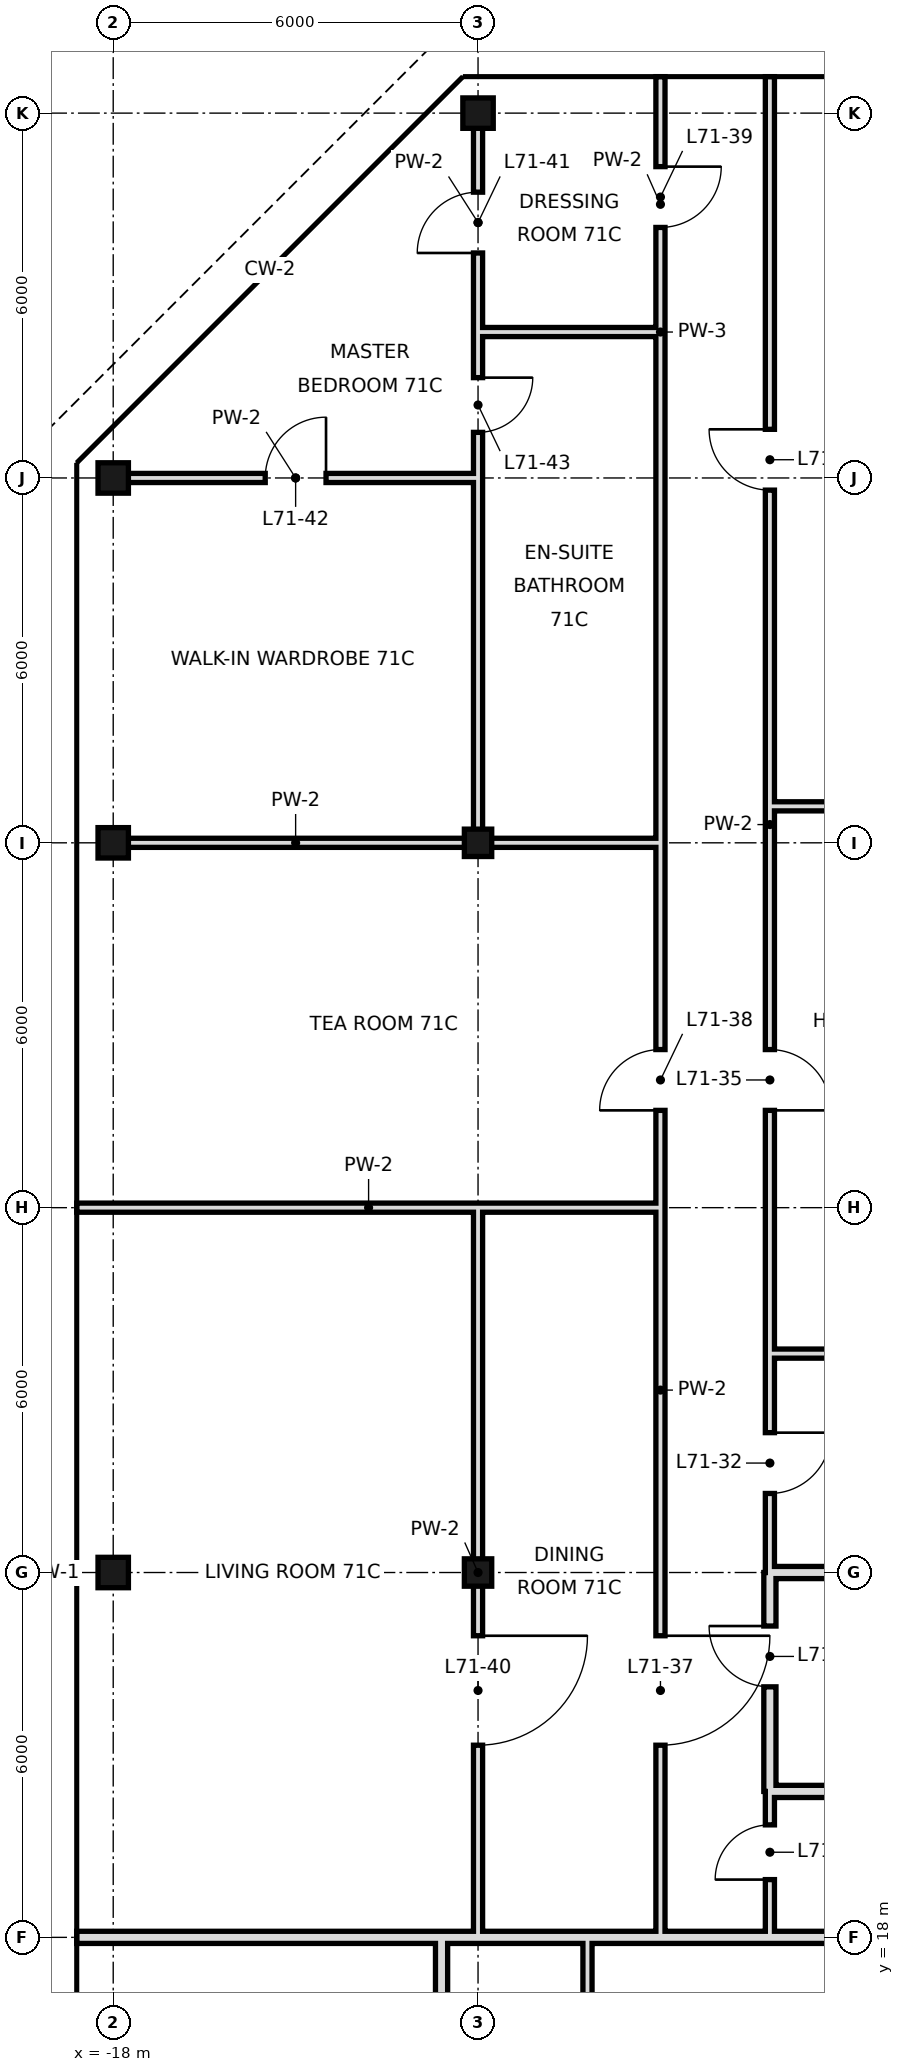
"""IFC4 building model, lengths in metres.
Left out: names, types, materials, properties, quantities, classifications, styles, units other than length and angle.
Written with IfcOpenShell. Run it as: python <this file> out.ifc"""

import sys

from ifc_helpers import new_model, si_unit, direction, frame, frame_2d, origin, origin_2d, place, context, subcontext, project, spatial, rectangle, hollow_rectangle, extrude, element, fill, save


model = new_model("IFC4")
c1 = context("Model", 3, precision=1e-05, world=origin(), true_north=direction((0.0, 1.0)))
c2 = subcontext(c1, "Body", "Model", "MODEL_VIEW")
j1 = project(units=[si_unit("LENGTHUNIT", "METRE"), si_unit("PLANEANGLEUNIT", "RADIAN")], contexts=[c1])
p1 = place(None, origin())
s1 = spatial("IfcSite", under=j1, at=p1, CompositionType="ELEMENT")
p2 = place(p1, origin())
s2 = spatial("IfcBuilding", under=s1, at=p2, CompositionType="ELEMENT")
p3 = place(p2, frame((0.0, 0.0, 301.6)))
s3 = spatial("IfcBuildingStorey", under=s2, at=p3, CompositionType="ELEMENT", Elevation=301.6)
for number, where, z_axis, x_axis in (
    (1, (-18.0, 24.0, 0.0), (0.0, 0.0, 1.0), (1.0, 0.0, 0.0)),
    (2, (-18.0, 36.0, 0.0), (0.0, 0.0, 1.0), (1.0, 0.0, 0.0)),
    (3, (-18.0, 42.0, 0.0), (0.0, 0.0, 1.0), (1.0, 0.0, 0.0)),
):
    element("IfcColumn", number, at=place(p3, frame(where, z_axis=z_axis, x_axis=x_axis)), inside=s3, PredefinedType="COLUMN", context=c2, shape_type="SweptSolid", body=[
        extrude(hollow_rectangle(XDim=0.5, YDim=0.5, WallThickness=0.025, at=origin_2d()), origin(), (0.0, 0.0, 1.0), 3.6),
    ])
for number, where, z_axis, x_axis in (
    (4, (-12.0, 24.0, 0.0), (0.0, 0.0, 1.0), (1.0, 0.0, 0.0)),
    (5, (-12.0, 36.0, 0.0), (0.0, 0.0, 1.0), (1.0, 0.0, 0.0)),
):
    element("IfcColumn", number, at=place(p3, frame(where, z_axis=z_axis, x_axis=x_axis)), inside=s3, PredefinedType="COLUMN", context=c2, shape_type="SweptSolid", body=[
        extrude(hollow_rectangle(XDim=0.45, YDim=0.45, WallThickness=0.022, at=origin_2d()), origin(), (0.0, 0.0, 1.0), 3.6),
    ])
p4 = place(p3, frame((-12.0, 48.0, 0.0), z_axis=(0.0, 0.0, 1.0), x_axis=(1.0, 0.0, 0.0)))
e6 = element("IfcColumn", 6, at=p4, inside=s3, PredefinedType="COLUMN", context=c2, shape_type="SweptSolid", body=[
    extrude(hollow_rectangle(XDim=0.5, YDim=0.5, WallThickness=0.025, at=origin_2d()), origin(), (0.0, 0.0, 1.0), 3.6),
])
p5 = place(p3, frame((-10.2, 10.8, 0.0), z_axis=(0.0, 0.0, 1.0), x_axis=(0.0, 1.0, 0.0)))
e7 = element("IfcWall", 7, at=p5, inside=s3, PredefinedType="PARTITIONING", context=c2, shape_type="SweptSolid", body=[
    extrude(rectangle(XDim=7.2, YDim=0.15, at=frame_2d((3.6, 0.0))), origin(), (0.0, 0.0, 1.0), 3.42),
])
p6 = place(p3, frame((-12.0, 18.0, 0.0), z_axis=(0.0, 0.0, 1.0), x_axis=(0.0, 1.0, 0.0)))
e8 = element("IfcWall", 8, at=p6, inside=s3, PredefinedType="PARTITIONING", context=c2, shape_type="SweptSolid", body=[
    extrude(rectangle(XDim=12.0, YDim=0.15, at=frame_2d((6.0, 0.0))), origin(), (0.0, 0.0, 1.0), 2.72),
])
p7 = place(p6, frame((3.16, 0.0, 0.0)))
e9 = element("IfcOpeningElement", 9, at=p7, cuts=e8, PredefinedType="OPENING", context=c2, shape_type="SweptSolid", body=[
    extrude(rectangle(XDim=1.8, YDim=2.4, at=frame_2d((0.9, 1.2))), frame((0.0, 0.085, 0.0), z_axis=(0.0, -1.0, 0.0), x_axis=(1.0, 0.0, 0.0)), (0.0, 0.0, 1.0), 0.17),
])
p8 = place(p3, frame((-12.0, 44.4, 0.0), z_axis=(0.0, 0.0, 1.0), x_axis=(0.0, 1.0, 0.0)))
e10 = element("IfcWall", 10, at=p8, inside=s3, PredefinedType="PARTITIONING", context=c2, shape_type="SweptSolid", body=[
    extrude(rectangle(XDim=3.6, YDim=0.15, at=frame_2d((1.8, 0.0))), origin(), (0.0, 0.0, 1.0), 2.72),
])
p9 = place(p8, frame((1.3, 0.0, 0.0)))
e11 = element("IfcOpeningElement", 11, at=p9, cuts=e10, PredefinedType="OPENING", context=c2, shape_type="SweptSolid", body=[
    extrude(rectangle(XDim=1.0, YDim=2.4, at=frame_2d((0.5, 1.2))), frame((0.0, 0.085, 0.0), z_axis=(0.0, -1.0, 0.0), x_axis=(1.0, 0.0, 0.0)), (0.0, 0.0, 1.0), 0.17),
])
p10 = place(p3, frame((-12.0, 36.0, 0.0), z_axis=(0.0, 0.0, 1.0), x_axis=(0.0, 1.0, 0.0)))
e12 = element("IfcWall", 12, at=p10, inside=s3, PredefinedType="PARTITIONING", context=c2, shape_type="SweptSolid", body=[
    extrude(rectangle(XDim=8.4, YDim=0.15, at=frame_2d((4.2, 0.0))), origin(), (0.0, 0.0, 1.0), 2.72),
])
p11 = place(p10, frame((6.75, 0.0, 0.0)))
e13 = element("IfcOpeningElement", 13, at=p11, cuts=e12, PredefinedType="OPENING", context=c2, shape_type="SweptSolid", body=[
    extrude(rectangle(XDim=0.9, YDim=2.4, at=frame_2d((0.45, 1.2))), frame((0.0, 0.085, 0.0), z_axis=(0.0, -1.0, 0.0), x_axis=(1.0, 0.0, 0.0)), (0.0, 0.0, 1.0), 0.17),
])
p12 = place(p3, frame((-12.6, 10.8, 0.0), z_axis=(0.0, 0.0, 1.0), x_axis=(0.0, 1.0, 0.0)))
e14 = element("IfcWall", 14, at=p12, inside=s3, PredefinedType="SOLIDWALL", context=c2, shape_type="SweptSolid", body=[
    extrude(rectangle(XDim=7.2, YDim=0.2, at=frame_2d((3.6, 0.0))), origin(), (0.0, 0.0, 1.0), 2.97),
])
p13 = place(p3, frame((-7.2, 20.4, 0.0), z_axis=(0.0, 0.0, 1.0), x_axis=(0.0, 1.0, 0.0)))
e15 = element("IfcWall", 15, at=p13, inside=s3, PredefinedType="SOLIDWALL", context=c2, shape_type="SweptSolid", body=[
    extrude(rectangle(XDim=3.6, YDim=0.2, at=frame_2d((1.8, 0.0))), origin(), (0.0, 0.0, 1.0), 2.72),
])
p14 = place(p13, frame((1.72, 0.0, 0.0)))
e16 = element("IfcOpeningElement", 16, at=p14, cuts=e15, PredefinedType="OPENING", context=c2, shape_type="SweptSolid", body=[
    extrude(rectangle(XDim=1.0, YDim=2.4, at=frame_2d((0.5, 1.2))), frame((0.0, 0.11, 0.0), z_axis=(0.0, -1.0, 0.0), x_axis=(1.0, 0.0, 0.0)), (0.0, 0.0, 1.0), 0.22),
])
p15 = place(p3, frame((-7.2, 24.0, 0.0), z_axis=(0.0, 0.0, 1.0), x_axis=(0.0, 1.0, 0.0)))
e17 = element("IfcWall", 17, at=p15, inside=s3, PredefinedType="PARTITIONING", context=c2, shape_type="SweptSolid", body=[
    extrude(rectangle(XDim=24.6, YDim=0.15, at=frame_2d((12.3, 0.0))), origin(), (0.0, 0.0, 1.0), 3.42),
])
p16 = place(p15, frame((1.3, 0.0, 0.0)))
e18 = element("IfcOpeningElement", 18, at=p16, cuts=e17, PredefinedType="OPENING", context=c2, shape_type="SweptSolid", body=[
    extrude(rectangle(XDim=1.0, YDim=2.4, at=frame_2d((0.5, 1.2))), frame((0.0, 0.085, 0.0), z_axis=(0.0, -1.0, 0.0), x_axis=(1.0, 0.0, 0.0)), (0.0, 0.0, 1.0), 0.17),
])
p17 = place(p15, frame((7.6, 0.0, 0.0)))
e19 = element("IfcOpeningElement", 19, at=p17, cuts=e17, PredefinedType="OPENING", context=c2, shape_type="SweptSolid", body=[
    extrude(rectangle(XDim=1.0, YDim=2.4, at=frame_2d((0.5, 1.2))), frame((0.0, 0.085, 0.0), z_axis=(0.0, -1.0, 0.0), x_axis=(1.0, 0.0, 0.0)), (0.0, 0.0, 1.0), 0.17),
])
p18 = place(p15, frame((17.8, 0.0, 0.0)))
e20 = element("IfcOpeningElement", 20, at=p18, cuts=e17, PredefinedType="OPENING", context=c2, shape_type="SweptSolid", body=[
    extrude(rectangle(XDim=1.0, YDim=2.4, at=frame_2d((0.5, 1.2))), frame((0.0, 0.085, 0.0), z_axis=(0.0, -1.0, 0.0), x_axis=(1.0, 0.0, 0.0)), (0.0, 0.0, 1.0), 0.17),
])
p19 = place(p3, frame((-7.2, 18.0, 0.0), z_axis=(0.0, 0.0, 1.0), x_axis=(0.0, 1.0, 0.0)))
e21 = element("IfcWall", 21, at=p19, inside=s3, PredefinedType="PARTITIONING", context=c2, shape_type="SweptSolid", body=[
    extrude(rectangle(XDim=2.4, YDim=0.15, at=frame_2d((1.2, 0.0))), origin(), (0.0, 0.0, 1.0), 3.42),
])
p20 = place(p19, frame((0.95, 0.0, 0.0)))
e22 = element("IfcOpeningElement", 22, at=p20, cuts=e21, PredefinedType="OPENING", context=c2, shape_type="SweptSolid", body=[
    extrude(rectangle(XDim=0.9, YDim=2.4, at=frame_2d((0.45, 1.2))), frame((0.0, 0.085, 0.0), z_axis=(0.0, -1.0, 0.0), x_axis=(1.0, 0.0, 0.0)), (0.0, 0.0, 1.0), 0.17),
])
p21 = place(p3, frame((-9.0, 18.0, 0.0), z_axis=(0.0, 0.0, 1.0), x_axis=(0.0, 1.0, 0.0)))
e23 = element("IfcWall", 23, at=p21, inside=s3, PredefinedType="PARTITIONING", context=c2, shape_type="SweptSolid", body=[
    extrude(rectangle(XDim=18.0, YDim=0.15, at=frame_2d((9.0, 0.0))), origin(), (0.0, 0.0, 1.0), 3.42),
])
p22 = place(p21, frame((3.16, 0.0, 0.0)))
e24 = element("IfcOpeningElement", 24, at=p22, cuts=e23, PredefinedType="OPENING", context=c2, shape_type="SweptSolid", body=[
    extrude(rectangle(XDim=1.8, YDim=2.4, at=frame_2d((0.9, 1.2))), frame((0.0, 0.085, 0.0), z_axis=(0.0, -1.0, 0.0), x_axis=(1.0, 0.0, 0.0)), (0.0, 0.0, 1.0), 0.17),
])
p23 = place(p21, frame((13.6, 0.0, 0.0)))
e25 = element("IfcOpeningElement", 25, at=p23, cuts=e23, PredefinedType="OPENING", context=c2, shape_type="SweptSolid", body=[
    extrude(rectangle(XDim=1.0, YDim=2.4, at=frame_2d((0.5, 1.2))), frame((0.0, 0.085, 0.0), z_axis=(0.0, -1.0, 0.0), x_axis=(1.0, 0.0, 0.0)), (0.0, 0.0, 1.0), 0.17),
])
p24 = place(p3, frame((-9.0, 44.4, 0.0), z_axis=(0.0, 0.0, 1.0), x_axis=(0.0, 1.0, 0.0)))
e26 = element("IfcWall", 26, at=p24, inside=s3, PredefinedType="PARTITIONING", context=c2, shape_type="SweptSolid", body=[
    extrude(rectangle(XDim=4.2, YDim=0.15, at=frame_2d((2.1, 0.0))), origin(), (0.0, 0.0, 1.0), 3.42),
])
p25 = place(p24, frame((1.72, 0.0, 0.0)))
e27 = element("IfcOpeningElement", 27, at=p25, cuts=e26, PredefinedType="OPENING", context=c2, shape_type="SweptSolid", body=[
    extrude(rectangle(XDim=1.0, YDim=2.4, at=frame_2d((0.5, 1.2))), frame((0.0, 0.085, 0.0), z_axis=(0.0, -1.0, 0.0), x_axis=(1.0, 0.0, 0.0)), (0.0, 0.0, 1.0), 0.17),
])
p26 = place(p3, frame((-9.0, 36.0, 0.0), z_axis=(0.0, 0.0, 1.0), x_axis=(0.0, 1.0, 0.0)))
e28 = element("IfcWall", 28, at=p26, inside=s3, PredefinedType="PARTITIONING", context=c2, shape_type="SweptSolid", body=[
    extrude(rectangle(XDim=8.4, YDim=0.15, at=frame_2d((4.2, 0.0))), origin(), (0.0, 0.0, 1.0), 3.42),
])
p27 = place(p3, frame((-18.6, 18.0, 0.0), z_axis=(0.0, 0.0, 1.0), x_axis=(1.0, 0.0, 0.0)))
e29 = element("IfcWall", 29, at=p27, inside=s3, PredefinedType="SOLIDWALL", context=c2, shape_type="SweptSolid", body=[
    extrude(rectangle(XDim=6.0, YDim=0.2, at=frame_2d((3.0, 0.0))), origin(), (0.0, 0.0, 1.0), 2.72),
])
p28 = place(p3, frame((-12.6, 18.0, 0.0), z_axis=(0.0, 0.0, 1.0), x_axis=(1.0, 0.0, 0.0)))
e30 = element("IfcWall", 30, at=p28, inside=s3, PredefinedType="SOLIDWALL", context=c2, shape_type="SweptSolid", body=[
    extrude(rectangle(XDim=15.7, YDim=0.2, at=frame_2d((7.85, 0.0))), origin(), (0.0, 0.0, 1.0), 2.72),
])
for number, where, z_axis, x_axis in (
    (31, (-7.2, 20.4, 0.0), (0.0, 0.0, 1.0), (1.0, 0.0, 0.0)),
    (32, (-7.2, 24.0, 0.0), (0.0, 0.0, 1.0), (1.0, 0.0, 0.0)),
):
    element("IfcWall", number, at=place(p3, frame(where, z_axis=z_axis, x_axis=x_axis)), inside=s3, PredefinedType="SOLIDWALL", context=c2, shape_type="SweptSolid", body=[
        extrude(rectangle(XDim=10.3, YDim=0.2, at=frame_2d((5.15, 0.0))), origin(), (0.0, 0.0, 1.0), 2.72),
    ])
p29 = place(p3, frame((-7.2, 27.6, 0.0), z_axis=(0.0, 0.0, 1.0), x_axis=(1.0, 0.0, 0.0)))
e33 = element("IfcWall", 33, at=p29, inside=s3, PredefinedType="PARTITIONING", context=c2, shape_type="SweptSolid", body=[
    extrude(rectangle(XDim=10.3, YDim=0.15, at=frame_2d((5.15, 0.0))), origin(), (0.0, 0.0, 1.0), 3.42),
])
p30 = place(p3, frame((-18.6, 30.0, 0.0), z_axis=(0.0, 0.0, 1.0), x_axis=(1.0, 0.0, 0.0)))
e34 = element("IfcWall", 34, at=p30, inside=s3, PredefinedType="PARTITIONING", context=c2, shape_type="SweptSolid", body=[
    extrude(rectangle(XDim=9.6, YDim=0.15, at=frame_2d((4.8, 0.0))), origin(), (0.0, 0.0, 1.0), 2.72),
])
p31 = place(p3, frame((-18.0, 36.0, 0.0), z_axis=(0.0, 0.0, 1.0), x_axis=(1.0, 0.0, 0.0)))
e35 = element("IfcWall", 35, at=p31, inside=s3, PredefinedType="PARTITIONING", context=c2, shape_type="SweptSolid", body=[
    extrude(rectangle(XDim=6.0, YDim=0.15, at=frame_2d((3.0, 0.0))), origin(), (0.0, 0.0, 1.0), 2.97),
])
p32 = place(p3, frame((-12.0, 36.0, 0.0), z_axis=(0.0, 0.0, 1.0), x_axis=(1.0, 0.0, 0.0)))
e36 = element("IfcWall", 36, at=p32, inside=s3, PredefinedType="PARTITIONING", context=c2, shape_type="SweptSolid", body=[
    extrude(rectangle(XDim=3.0, YDim=0.15, at=frame_2d((1.5, 0.0))), origin(), (0.0, 0.0, 1.0), 2.72),
])
p33 = place(p3, frame((-7.2, 36.6, 0.0), z_axis=(0.0, 0.0, 1.0), x_axis=(1.0, 0.0, 0.0)))
e37 = element("IfcWall", 37, at=p33, inside=s3, PredefinedType="PARTITIONING", context=c2, shape_type="SweptSolid", body=[
    extrude(rectangle(XDim=10.3, YDim=0.15, at=frame_2d((5.15, 0.0))), origin(), (0.0, 0.0, 1.0), 3.42),
])
p34 = place(p3, frame((-18.0, 42.0, 0.0), z_axis=(0.0, 0.0, 1.0), x_axis=(1.0, 0.0, 0.0)))
e38 = element("IfcWall", 38, at=p34, inside=s3, PredefinedType="PARTITIONING", context=c2, shape_type="SweptSolid", body=[
    extrude(rectangle(XDim=6.0, YDim=0.15, at=frame_2d((3.0, 0.0))), origin(), (0.0, 0.0, 1.0), 2.97),
])
p35 = place(p34, frame((2.5, 0.0, 0.0)))
e39 = element("IfcOpeningElement", 39, at=p35, cuts=e38, PredefinedType="OPENING", context=c2, shape_type="SweptSolid", body=[
    extrude(rectangle(XDim=1.0, YDim=2.4, at=frame_2d((0.5, 1.2))), frame((0.0, 0.085, 0.0), z_axis=(0.0, -1.0, 0.0), x_axis=(1.0, 0.0, 0.0)), (0.0, 0.0, 1.0), 0.17),
])
p36 = place(p3, frame((-12.0, 44.4, 0.0), z_axis=(0.0, 0.0, 1.0), x_axis=(1.0, 0.0, 0.0)))
e40 = element("IfcWall", 40, at=p36, inside=s3, PredefinedType="PARTITIONING", context=c2, shape_type="SweptSolid", body=[
    extrude(rectangle(XDim=3.0, YDim=0.15, at=frame_2d((1.5, 0.0))), origin(), (0.0, 0.0, 1.0), 3.42),
])
p37 = place(p16, origin())
e41 = element("IfcDoor", 41, at=p37, inside=s3, OperationType="SINGLE_SWING_RIGHT", PredefinedType="DOOR", context=c2, shape_type="SweptSolid", body=[
    extrude(rectangle(XDim=1.0, YDim=2.4, at=frame_2d((0.5, 1.2))), frame((0.0, 0.025, 0.0), z_axis=(0.0, -1.0, 0.0), x_axis=(1.0, 0.0, 0.0)), (0.0, 0.0, 1.0), 0.05),
])
fill(e18, e41)
p38 = place(p20, origin())
e42 = element("IfcDoor", 42, at=p38, inside=s3, OperationType="SINGLE_SWING_LEFT", PredefinedType="DOOR", context=c2, shape_type="SweptSolid", body=[
    extrude(rectangle(XDim=0.9, YDim=2.4, at=frame_2d((0.45, 1.2))), frame((0.0, 0.025, 0.0), z_axis=(0.0, -1.0, 0.0), x_axis=(1.0, 0.0, 0.0)), (0.0, 0.0, 1.0), 0.05),
])
fill(e22, e42)
p39 = place(p14, frame((1.0, 0.0, 0.0), z_axis=(0.0, 0.0, 1.0), x_axis=(-1.0, 0.0, 0.0)))
e43 = element("IfcDoor", 43, at=p39, inside=s3, OperationType="SINGLE_SWING_LEFT", PredefinedType="DOOR", context=c2, shape_type="SweptSolid", body=[
    extrude(rectangle(XDim=1.0, YDim=2.4, at=frame_2d((0.5, 1.2))), frame((0.0, 0.025, 0.0), z_axis=(0.0, -1.0, 0.0), x_axis=(1.0, 0.0, 0.0)), (0.0, 0.0, 1.0), 0.05),
])
fill(e16, e43)
p40 = place(p17, frame((1.0, 0.0, 0.0), z_axis=(0.0, 0.0, 1.0), x_axis=(-1.0, 0.0, 0.0)))
e44 = element("IfcDoor", 44, at=p40, inside=s3, OperationType="SINGLE_SWING_RIGHT", PredefinedType="DOOR", context=c2, shape_type="SweptSolid", body=[
    extrude(rectangle(XDim=1.0, YDim=2.4, at=frame_2d((0.5, 1.2))), frame((0.0, 0.025, 0.0), z_axis=(0.0, -1.0, 0.0), x_axis=(1.0, 0.0, 0.0)), (0.0, 0.0, 1.0), 0.05),
])
fill(e19, e44)
p41 = place(p18, frame((1.0, 0.0, 0.0), z_axis=(0.0, 0.0, 1.0), x_axis=(-1.0, 0.0, 0.0)))
e45 = element("IfcDoor", 45, at=p41, inside=s3, OperationType="SINGLE_SWING_LEFT", PredefinedType="DOOR", context=c2, shape_type="SweptSolid", body=[
    extrude(rectangle(XDim=1.0, YDim=2.4, at=frame_2d((0.5, 1.2))), frame((0.0, 0.025, 0.0), z_axis=(0.0, -1.0, 0.0), x_axis=(1.0, 0.0, 0.0)), (0.0, 0.0, 1.0), 0.05),
])
fill(e20, e45)
p42 = place(p22, origin())
e46 = element("IfcDoor", 46, at=p42, inside=s3, OperationType="SINGLE_SWING_RIGHT", PredefinedType="DOOR", context=c2, shape_type="SweptSolid", body=[
    extrude(rectangle(XDim=1.8, YDim=2.4, at=frame_2d((0.9, 1.2))), frame((0.0, 0.025, 0.0), z_axis=(0.0, -1.0, 0.0), x_axis=(1.0, 0.0, 0.0)), (0.0, 0.0, 1.0), 0.05),
])
fill(e24, e46)
p43 = place(p23, origin())
e47 = element("IfcDoor", 47, at=p43, inside=s3, OperationType="SINGLE_SWING_LEFT", PredefinedType="DOOR", context=c2, shape_type="SweptSolid", body=[
    extrude(rectangle(XDim=1.0, YDim=2.4, at=frame_2d((0.5, 1.2))), frame((0.0, 0.025, 0.0), z_axis=(0.0, -1.0, 0.0), x_axis=(1.0, 0.0, 0.0)), (0.0, 0.0, 1.0), 0.05),
])
fill(e25, e47)
p44 = place(p25, origin())
e48 = element("IfcDoor", 48, at=p44, inside=s3, OperationType="SINGLE_SWING_RIGHT", PredefinedType="DOOR", context=c2, shape_type="SweptSolid", body=[
    extrude(rectangle(XDim=1.0, YDim=2.4, at=frame_2d((0.5, 1.2))), frame((0.0, 0.025, 0.0), z_axis=(0.0, -1.0, 0.0), x_axis=(1.0, 0.0, 0.0)), (0.0, 0.0, 1.0), 0.05),
])
fill(e27, e48)
p45 = place(p7, origin())
e49 = element("IfcDoor", 49, at=p45, inside=s3, OperationType="SINGLE_SWING_RIGHT", PredefinedType="DOOR", context=c2, shape_type="SweptSolid", body=[
    extrude(rectangle(XDim=1.8, YDim=2.4, at=frame_2d((0.9, 1.2))), frame((0.0, 0.025, 0.0), z_axis=(0.0, -1.0, 0.0), x_axis=(1.0, 0.0, 0.0)), (0.0, 0.0, 1.0), 0.05),
])
fill(e9, e49)
p46 = place(p9, origin())
e50 = element("IfcDoor", 50, at=p46, inside=s3, OperationType="SINGLE_SWING_LEFT", PredefinedType="DOOR", context=c2, shape_type="SweptSolid", body=[
    extrude(rectangle(XDim=1.0, YDim=2.4, at=frame_2d((0.5, 1.2))), frame((0.0, 0.025, 0.0), z_axis=(0.0, -1.0, 0.0), x_axis=(1.0, 0.0, 0.0)), (0.0, 0.0, 1.0), 0.05),
])
fill(e11, e50)
p47 = place(p35, frame((1.0, 0.0, 0.0), z_axis=(0.0, 0.0, 1.0), x_axis=(-1.0, 0.0, 0.0)))
e51 = element("IfcDoor", 51, at=p47, inside=s3, OperationType="SINGLE_SWING_LEFT", PredefinedType="DOOR", context=c2, shape_type="SweptSolid", body=[
    extrude(rectangle(XDim=1.0, YDim=2.4, at=frame_2d((0.5, 1.2))), frame((0.0, 0.025, 0.0), z_axis=(0.0, -1.0, 0.0), x_axis=(1.0, 0.0, 0.0)), (0.0, 0.0, 1.0), 0.05),
])
fill(e39, e51)
p48 = place(p11, origin())
e52 = element("IfcDoor", 52, at=p48, inside=s3, OperationType="SINGLE_SWING_RIGHT", PredefinedType="DOOR", context=c2, shape_type="SweptSolid", body=[
    extrude(rectangle(XDim=0.9, YDim=2.4, at=frame_2d((0.45, 1.2))), frame((0.0, 0.025, 0.0), z_axis=(0.0, -1.0, 0.0), x_axis=(1.0, 0.0, 0.0)), (0.0, 0.0, 1.0), 0.05),
])
fill(e13, e52)
save(model, sys.argv[1])
